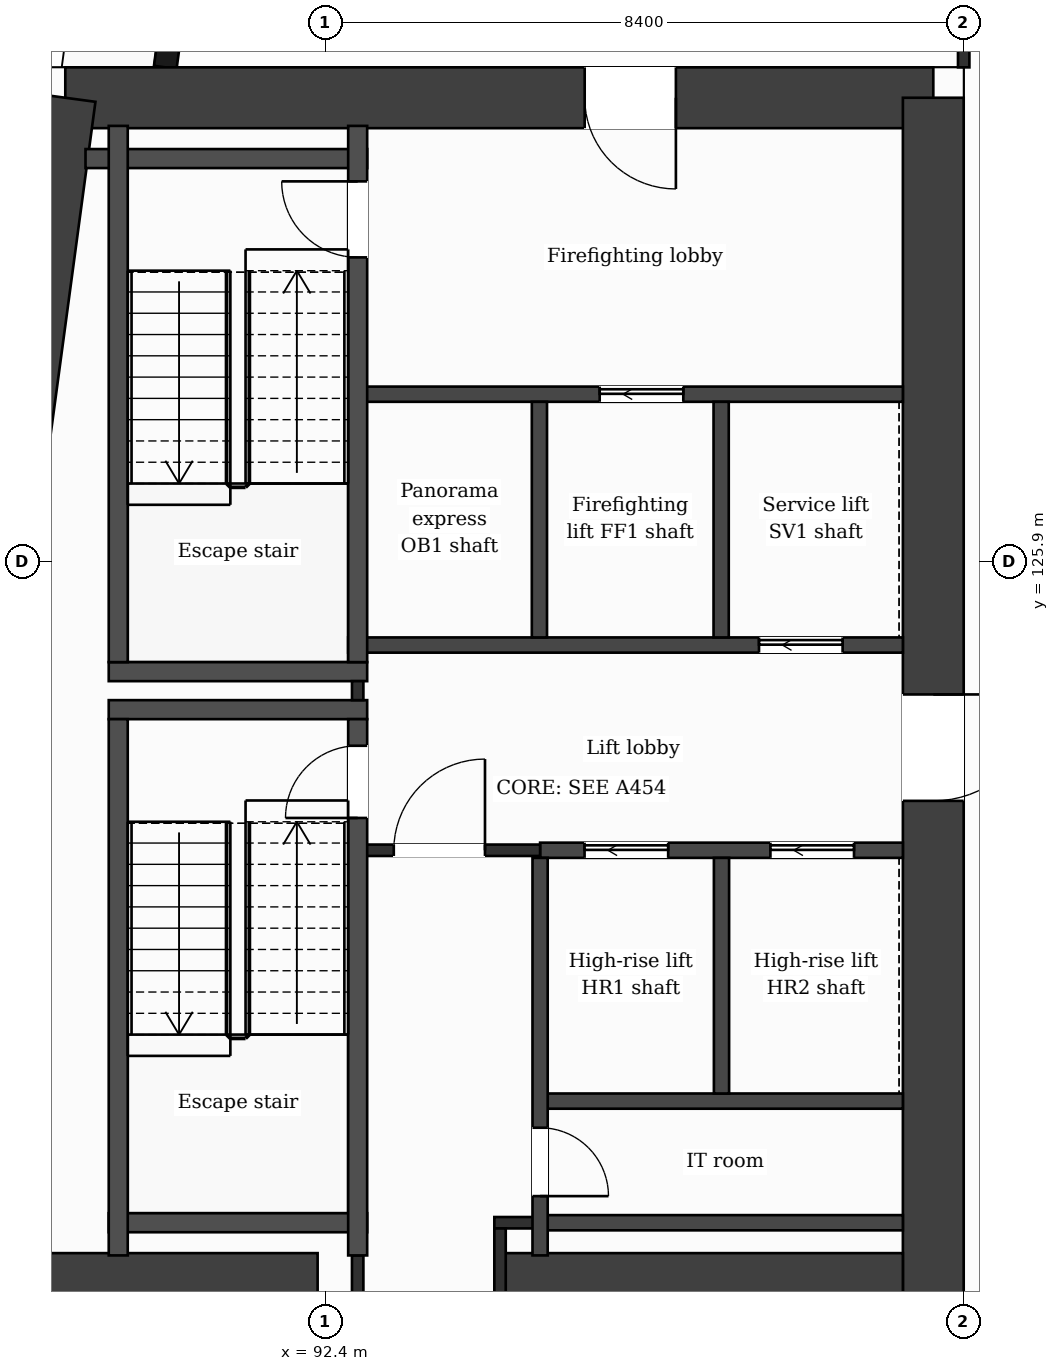
"""IFC4 building model, lengths in metres.
Left out: names, types, materials, properties, quantities, classifications, styles, units other than length and angle.
Written with IfcOpenShell. Run it as: python <this file> out.ifc"""

import sys

from ifc_helpers import new_model, si_unit, direction, frame, frame_2d, origin, place, context, subcontext, project, spatial, rectangle, extrude, element, fill, save


model = new_model("IFC4")
c1 = context("Model", 3, precision=1e-05, world=origin(), true_north=direction((0.0, 1.0)))
c2 = subcontext(c1, "Body", "Model", "MODEL_VIEW")
j1 = project(units=[si_unit("LENGTHUNIT", "METRE"), si_unit("PLANEANGLEUNIT", "RADIAN")], contexts=[c1])
p1 = place(None, origin())
s1 = spatial("IfcSite", under=j1, at=p1, CompositionType="ELEMENT")
p2 = place(p1, origin())
s2 = spatial("IfcBuilding", under=s1, at=p2, CompositionType="ELEMENT")
p3 = place(p2, frame((0.0, 0.0, 220.7)))
s3 = spatial("IfcBuildingStorey", under=s2, at=p3, CompositionType="ELEMENT", Elevation=220.7)
p4 = place(p3, frame((88.98, 132.0, 0.0), z_axis=(0.0, 0.0, 1.0), x_axis=(1.0, 0.0, 0.0)))
e1 = element("IfcWall", 1, at=p4, inside=s3, PredefinedType="SHEAR", context=c2, shape_type="SweptSolid", body=[
    extrude(rectangle(XDim=11.419, YDim=0.8, at=frame_2d((5.71, 0.0))), origin(), (0.0, 0.0, 1.0), 3.7),
])
p5 = place(p4, frame((6.833, 0.0, 0.0)))
e2 = element("IfcOpeningElement", 2, at=p5, cuts=e1, PredefinedType="OPENING", context=c2, shape_type="SweptSolid", body=[
    extrude(rectangle(XDim=1.2, YDim=2.1, at=frame_2d((0.6, 1.05))), frame((0.0, 0.41, 0.0), z_axis=(0.0, -1.0, 0.0), x_axis=(1.0, 0.0, 0.0)), (0.0, 0.0, 1.0), 0.82),
])
p6 = place(p3, frame((100.4, 132.0, 0.0), z_axis=(0.0, 0.0, 1.0), x_axis=(0.0, -1.0, 0.0)))
e3 = element("IfcWall", 3, at=p6, inside=s3, PredefinedType="SHEAR", context=c2, shape_type="SweptSolid", body=[
    extrude(rectangle(XDim=21.2, YDim=0.8, at=frame_2d((10.6, 0.0))), origin(), (0.0, 0.0, 1.0), 3.7),
])
p7 = place(p6, frame((7.85, 0.0, 0.0)))
e4 = element("IfcOpeningElement", 4, at=p7, cuts=e3, PredefinedType="OPENING", context=c2, shape_type="SweptSolid", body=[
    extrude(rectangle(XDim=1.4, YDim=2.1, at=frame_2d((0.7, 1.05))), frame((0.0, 0.41, 0.0), z_axis=(0.0, -1.0, 0.0), x_axis=(1.0, 0.0, 0.0)), (0.0, 0.0, 1.0), 0.82),
])
p8 = place(p3, frame((86.127, 110.8, 0.0), z_axis=(0.0, 0.0, 1.0), x_axis=(0.133408347329, 0.991061154956, 0.0)))
e5 = element("IfcWall", 5, at=p8, inside=s3, PredefinedType="SHEAR", context=c2, shape_type="SweptSolid", body=[
    extrude(rectangle(XDim=21.391, YDim=0.8, at=frame_2d((10.696, 0.0))), origin(), (0.0, 0.0, 1.0), 3.7),
])
p9 = place(p3, frame((87.223, 116.4, 0.0), z_axis=(0.0, 0.0, 1.0), x_axis=(1.0, 0.0, 0.0)))
e6 = element("IfcWall", 6, at=p9, inside=s3, PredefinedType="SHEAR", context=c2, shape_type="SweptSolid", body=[
    extrude(rectangle(XDim=5.077, YDim=0.8, at=frame_2d((2.539, 0.0))), origin(), (0.0, 0.0, 1.0), 3.7),
])
p10 = place(p3, frame((94.7, 116.4, 0.0), z_axis=(0.0, 0.0, 1.0), x_axis=(1.0, 0.0, 0.0)))
e7 = element("IfcWall", 7, at=p10, inside=s3, PredefinedType="SHEAR", context=c2, shape_type="SweptSolid", body=[
    extrude(rectangle(XDim=5.3, YDim=0.8, at=frame_2d((2.65, 0.0))), origin(), (0.0, 0.0, 1.0), 3.7),
])
p11 = place(p3, frame((91.177, 138.95, 0.0), z_axis=(0.0, 0.0, 1.0), x_axis=(-0.133426664613, -0.991058689065, 0.0)))
e8 = element("IfcWall", 8, at=p11, inside=s3, PredefinedType="SOLIDWALL", context=c2, shape_type="SweptSolid", body=[
    extrude(rectangle(XDim=6.609, YDim=0.3, at=frame_2d((3.305, 0.0))), origin(), (0.0, 0.0, 1.0), 3.38),
])
p12 = place(p11, frame((1.039, 0.0, 0.9)))
e9 = element("IfcOpeningElement", 9, at=p12, cuts=e8, PredefinedType="OPENING", context=c2, shape_type="SweptSolid", body=[
    extrude(rectangle(XDim=1.2, YDim=2.1, at=frame_2d((0.6, 1.05))), frame((0.0, 0.16, 0.0), z_axis=(0.0, -1.0, 0.0), x_axis=(1.0, 0.0, 0.0)), (0.0, 0.0, 1.0), 0.32),
])
p13 = place(p11, frame((4.294, 0.0, 0.0)))
e10 = element("IfcOpeningElement", 10, at=p13, cuts=e8, PredefinedType="OPENING", context=c2, shape_type="SweptSolid", body=[
    extrude(rectangle(XDim=1.2, YDim=2.4, at=frame_2d((0.6, 1.2))), frame((0.0, 0.16, 0.0), z_axis=(0.0, -1.0, 0.0), x_axis=(1.0, 0.0, 0.0)), (0.0, 0.0, 1.0), 0.32),
])
p14 = place(p3, frame((95.227, 117.2, 0.0), z_axis=(0.0, 0.0, 1.0), x_axis=(1.0, 0.0, 0.0)))
e11 = element("IfcWall", 11, at=p14, inside=s3, PredefinedType="PARTITIONING", context=c2, shape_type="SweptSolid", body=[
    extrude(rectangle(XDim=4.773, YDim=0.2, at=frame_2d((2.386, 0.0))), origin(), (0.0, 0.0, 1.0), 3.38),
])
p15 = place(p3, frame((94.625, 117.2, 0.0), z_axis=(0.0, 0.0, 1.0), x_axis=(1.0, 0.0, 0.0)))
e12 = element("IfcWall", 12, at=p15, inside=s3, PredefinedType="PARTITIONING", context=c2, shape_type="SweptSolid", body=[
    extrude(rectangle(XDim=0.602, YDim=0.15, at=frame_2d((0.301, 0.0))), origin(), (0.0, 0.0, 1.0), 3.38),
])
p16 = place(p3, frame((89.552, 117.2, 0.0), z_axis=(0.0, 0.0, 1.0), x_axis=(1.0, 0.0, 0.0)))
e13 = element("IfcWall", 13, at=p16, inside=s3, PredefinedType="PARTITIONING", context=c2, shape_type="SweptSolid", body=[
    extrude(rectangle(XDim=3.4, YDim=0.25, at=frame_2d((1.7, 0.0))), origin(), (0.0, 0.0, 1.0), 3.38),
])
p17 = place(p3, frame((95.227, 118.8, 0.0), z_axis=(0.0, 0.0, 1.0), x_axis=(1.0, 0.0, 0.0)))
e14 = element("IfcWall", 14, at=p17, inside=s3, PredefinedType="PARTITIONING", context=c2, shape_type="SweptSolid", body=[
    extrude(rectangle(XDim=4.773, YDim=0.2, at=frame_2d((2.386, 0.0))), origin(), (0.0, 0.0, 1.0), 3.38),
])
p18 = place(p3, frame((95.227, 122.1, 0.0), z_axis=(0.0, 0.0, 1.0), x_axis=(1.0, 0.0, 0.0)))
e15 = element("IfcWall", 15, at=p18, inside=s3, PredefinedType="PARTITIONING", context=c2, shape_type="SweptSolid", body=[
    extrude(rectangle(XDim=4.773, YDim=0.2, at=frame_2d((2.386, 0.0))), origin(), (0.0, 0.0, 1.0), 3.38),
])
p19 = place(p18, frame((0.585, 0.0, 0.0)))
e16 = element("IfcOpeningElement", 16, at=p19, cuts=e15, PredefinedType="OPENING", context=c2, shape_type="SweptSolid", body=[
    extrude(rectangle(XDim=1.1, YDim=2.1, at=frame_2d((0.55, 1.05))), frame((0.0, 0.11, 0.0), z_axis=(0.0, -1.0, 0.0), x_axis=(1.0, 0.0, 0.0)), (0.0, 0.0, 1.0), 0.22),
])
p20 = place(p18, frame((3.03, 0.0, 0.0)))
e17 = element("IfcOpeningElement", 17, at=p20, cuts=e15, PredefinedType="OPENING", context=c2, shape_type="SweptSolid", body=[
    extrude(rectangle(XDim=1.1, YDim=2.1, at=frame_2d((0.55, 1.05))), frame((0.0, 0.11, 0.0), z_axis=(0.0, -1.0, 0.0), x_axis=(1.0, 0.0, 0.0)), (0.0, 0.0, 1.0), 0.22),
])
p21 = place(p3, frame((92.827, 122.1, 0.0), z_axis=(0.0, 0.0, 1.0), x_axis=(1.0, 0.0, 0.0)))
e18 = element("IfcWall", 18, at=p21, inside=s3, PredefinedType="PARTITIONING", context=c2, shape_type="SweptSolid", body=[
    extrude(rectangle(XDim=2.4, YDim=0.15, at=frame_2d((1.2, 0.0))), origin(), (0.0, 0.0, 1.0), 3.38),
])
p22 = place(p21, frame((0.475, 0.0, 0.0)))
e19 = element("IfcOpeningElement", 19, at=p22, cuts=e18, PredefinedType="OPENING", context=c2, shape_type="SweptSolid", body=[
    extrude(rectangle(XDim=1.2, YDim=2.1, at=frame_2d((0.6, 1.05))), frame((0.0, 0.085, 0.0), z_axis=(0.0, -1.0, 0.0), x_axis=(1.0, 0.0, 0.0)), (0.0, 0.0, 1.0), 0.17),
])
for number, where, z_axis, x_axis in (
    (20, (89.552, 123.95, 0.0), (0.0, 0.0, 1.0), (1.0, 0.0, 0.0)),
    (21, (89.552, 124.45, 0.0), (0.0, 0.0, 1.0), (1.0, 0.0, 0.0)),
):
    element("IfcWall", number, at=place(p3, frame(where, z_axis=z_axis, x_axis=x_axis)), inside=s3, PredefinedType="PARTITIONING", context=c2, shape_type="SweptSolid", body=[
        extrude(rectangle(XDim=3.4, YDim=0.25, at=frame_2d((1.7, 0.0))), origin(), (0.0, 0.0, 1.0), 3.38),
    ])
p23 = place(p3, frame((92.702, 124.8, 0.0), z_axis=(0.0, 0.0, 1.0), x_axis=(1.0, 0.0, 0.0)))
e22 = element("IfcWall", 22, at=p23, inside=s3, PredefinedType="PARTITIONING", context=c2, shape_type="SweptSolid", body=[
    extrude(rectangle(XDim=7.298, YDim=0.2, at=frame_2d((3.649, 0.0))), origin(), (0.0, 0.0, 1.0), 3.38),
])
p24 = place(p23, frame((5.405, 0.0, 0.0)))
e23 = element("IfcOpeningElement", 23, at=p24, cuts=e22, PredefinedType="OPENING", context=c2, shape_type="SweptSolid", body=[
    extrude(rectangle(XDim=1.1, YDim=2.1, at=frame_2d((0.55, 1.05))), frame((0.0, 0.11, 0.0), z_axis=(0.0, -1.0, 0.0), x_axis=(1.0, 0.0, 0.0)), (0.0, 0.0, 1.0), 0.22),
])
p25 = place(p3, frame((92.827, 128.1, 0.0), z_axis=(0.0, 0.0, 1.0), x_axis=(1.0, 0.0, 0.0)))
e24 = element("IfcWall", 24, at=p25, inside=s3, PredefinedType="PARTITIONING", context=c2, shape_type="SweptSolid", body=[
    extrude(rectangle(XDim=7.173, YDim=0.2, at=frame_2d((3.586, 0.0))), origin(), (0.0, 0.0, 1.0), 3.38),
])
p26 = place(p25, frame((3.184, 0.0, 0.0)))
e25 = element("IfcOpeningElement", 25, at=p26, cuts=e24, PredefinedType="OPENING", context=c2, shape_type="SweptSolid", body=[
    extrude(rectangle(XDim=1.1, YDim=2.1, at=frame_2d((0.55, 1.05))), frame((0.0, 0.11, 0.0), z_axis=(0.0, -1.0, 0.0), x_axis=(1.0, 0.0, 0.0)), (0.0, 0.0, 1.0), 0.22),
])
p27 = place(p3, frame((89.246, 131.2, 0.0), z_axis=(0.0, 0.0, 1.0), x_axis=(1.0, 0.0, 0.0)))
e26 = element("IfcWall", 26, at=p27, inside=s3, PredefinedType="PARTITIONING", context=c2, shape_type="SweptSolid", body=[
    extrude(rectangle(XDim=3.706, YDim=0.25, at=frame_2d((1.853, 0.0))), origin(), (0.0, 0.0, 1.0), 3.38),
])
for number, where, z_axis, x_axis in (
    (27, (89.677, 116.77, 0.0), (0.0, 0.0, 1.0), (0.0, 1.0, 0.0)),
    (28, (89.677, 124.575, 0.0), (0.0, 0.0, 1.0), (0.0, 1.0, 0.0)),
):
    element("IfcWall", number, at=place(p3, frame(where, z_axis=z_axis, x_axis=x_axis)), inside=s3, PredefinedType="PARTITIONING", context=c2, shape_type="SweptSolid", body=[
        extrude(rectangle(XDim=7.055, YDim=0.25, at=frame_2d((3.527, 0.0))), origin(), (0.0, 0.0, 1.0), 3.38),
    ])
p28 = place(p3, frame((92.827, 116.0, 0.0), z_axis=(0.0, 0.0, 1.0), x_axis=(0.0, 1.0, 0.0)))
e29 = element("IfcWall", 29, at=p28, inside=s3, PredefinedType="PARTITIONING", context=c2, shape_type="SweptSolid", body=[
    extrude(rectangle(XDim=0.77, YDim=0.15, at=frame_2d((0.385, 0.0))), origin(), (0.0, 0.0, 1.0), 3.38),
])
p29 = place(p3, frame((92.827, 124.075, 0.0), z_axis=(0.0, 0.0, 1.0), x_axis=(0.0, 1.0, 0.0)))
e30 = element("IfcWall", 30, at=p29, inside=s3, PredefinedType="PARTITIONING", context=c2, shape_type="SweptSolid", body=[
    extrude(rectangle(XDim=0.25, YDim=0.15, at=frame_2d((0.125, 0.0))), origin(), (0.0, 0.0, 1.0), 3.38),
])
p30 = place(p3, frame((92.827, 116.77, 0.0), z_axis=(0.0, 0.0, 1.0), x_axis=(0.0, 1.0, 0.0)))
e31 = element("IfcWall", 31, at=p30, inside=s3, PredefinedType="PARTITIONING", context=c2, shape_type="SweptSolid", body=[
    extrude(rectangle(XDim=7.055, YDim=0.25, at=frame_2d((3.527, 0.0))), origin(), (0.0, 0.0, 1.0), 3.38),
])
p31 = place(p30, frame((5.755, 0.0, 0.0)))
e32 = element("IfcOpeningElement", 32, at=p31, cuts=e31, PredefinedType="OPENING", context=c2, shape_type="SweptSolid", body=[
    extrude(rectangle(XDim=0.95, YDim=2.1, at=frame_2d((0.475, 1.05))), frame((0.0, 0.135, 0.0), z_axis=(0.0, -1.0, 0.0), x_axis=(1.0, 0.0, 0.0)), (0.0, 0.0, 1.0), 0.27),
])
p32 = place(p3, frame((92.827, 124.575, 0.0), z_axis=(0.0, 0.0, 1.0), x_axis=(0.0, 1.0, 0.0)))
e33 = element("IfcWall", 33, at=p32, inside=s3, PredefinedType="PARTITIONING", context=c2, shape_type="SweptSolid", body=[
    extrude(rectangle(XDim=7.055, YDim=0.25, at=frame_2d((3.527, 0.0))), origin(), (0.0, 0.0, 1.0), 3.38),
])
p33 = place(p32, frame((5.325, 0.0, 0.0)))
e34 = element("IfcOpeningElement", 34, at=p33, cuts=e33, PredefinedType="OPENING", context=c2, shape_type="SweptSolid", body=[
    extrude(rectangle(XDim=1.0, YDim=2.1, at=frame_2d((0.5, 1.05))), frame((0.0, 0.135, 0.0), z_axis=(0.0, -1.0, 0.0), x_axis=(1.0, 0.0, 0.0)), (0.0, 0.0, 1.0), 0.27),
])
p34 = place(p3, frame((94.7, 116.0, 0.0), z_axis=(0.0, 0.0, 1.0), x_axis=(0.0, 1.0, 0.0)))
e35 = element("IfcWall", 35, at=p34, inside=s3, PredefinedType="PARTITIONING", context=c2, shape_type="SweptSolid", body=[
    extrude(rectangle(XDim=1.125, YDim=0.15, at=frame_2d((0.562, 0.0))), origin(), (0.0, 0.0, 1.0), 3.38),
])
p35 = place(p3, frame((95.218, 124.9, 0.0), z_axis=(0.0, 0.0, 1.0), x_axis=(0.0, 1.0, 0.0)))
e36 = element("IfcWall", 36, at=p35, inside=s3, PredefinedType="PARTITIONING", context=c2, shape_type="SweptSolid", body=[
    extrude(rectangle(XDim=3.1, YDim=0.2, at=frame_2d((1.55, 0.0))), origin(), (0.0, 0.0, 1.0), 3.38),
])
p36 = place(p3, frame((95.227, 116.77, 0.0), z_axis=(0.0, 0.0, 1.0), x_axis=(0.0, 1.0, 0.0)))
e37 = element("IfcWall", 37, at=p36, inside=s3, PredefinedType="PARTITIONING", context=c2, shape_type="SweptSolid", body=[
    extrude(rectangle(XDim=5.23, YDim=0.2, at=frame_2d((2.615, 0.0))), origin(), (0.0, 0.0, 1.0), 3.38),
])
p37 = place(p36, frame((0.78, 0.0, 0.0)))
e38 = element("IfcOpeningElement", 38, at=p37, cuts=e37, PredefinedType="OPENING", context=c2, shape_type="SweptSolid", body=[
    extrude(rectangle(XDim=0.9, YDim=2.1, at=frame_2d((0.45, 1.05))), frame((0.0, 0.11, 0.0), z_axis=(0.0, -1.0, 0.0), x_axis=(1.0, 0.0, 0.0)), (0.0, 0.0, 1.0), 0.22),
])
for number, where, z_axis, x_axis in (
    (39, (97.609, 124.9, 0.0), (0.0, 0.0, 1.0), (0.0, 1.0, 0.0)),
    (40, (97.614, 118.9, 0.0), (0.0, 0.0, 1.0), (0.0, 1.0, 0.0)),
):
    element("IfcWall", number, at=place(p3, frame(where, z_axis=z_axis, x_axis=x_axis)), inside=s3, PredefinedType="PARTITIONING", context=c2, shape_type="SweptSolid", body=[
        extrude(rectangle(XDim=3.1, YDim=0.2, at=frame_2d((1.55, 0.0))), origin(), (0.0, 0.0, 1.0), 3.38),
    ])
p38 = place(p3, frame((100.8, 132.4, 0.0), z_axis=(0.0, 0.0, 1.0), x_axis=(0.0, 1.0, 0.0)))
e41 = element("IfcWall", 41, at=p38, inside=s3, PredefinedType="PARTITIONING", context=c2, shape_type="SweptSolid", body=[
    extrude(rectangle(XDim=1.325, YDim=0.15, at=frame_2d((0.663, 0.0))), origin(), (0.0, 0.0, 1.0), 3.38),
])
p39 = place(p22, origin())
e42 = element("IfcDoor", 42, at=p39, inside=s3, OperationType="SINGLE_SWING_RIGHT", PredefinedType="DOOR", context=c2, shape_type="SweptSolid", body=[
    extrude(rectangle(XDim=1.2, YDim=2.1, at=frame_2d((0.6, 1.05))), frame((0.0, 0.025, 0.0), z_axis=(0.0, -1.0, 0.0), x_axis=(1.0, 0.0, 0.0)), (0.0, 0.0, 1.0), 0.05),
])
fill(e19, e42)
p40 = place(p19, origin())
e43 = element("IfcDoor", 43, at=p40, inside=s3, OperationType="SLIDING_TO_LEFT", PredefinedType="DOOR", context=c2, shape_type="SweptSolid", body=[
    extrude(rectangle(XDim=1.1, YDim=2.1, at=frame_2d((0.55, 1.05))), frame((0.0, 0.025, 0.0), z_axis=(0.0, -1.0, 0.0), x_axis=(1.0, 0.0, 0.0)), (0.0, 0.0, 1.0), 0.05),
])
fill(e16, e43)
p41 = place(p20, origin())
e44 = element("IfcDoor", 44, at=p41, inside=s3, OperationType="SLIDING_TO_LEFT", PredefinedType="DOOR", context=c2, shape_type="SweptSolid", body=[
    extrude(rectangle(XDim=1.1, YDim=2.1, at=frame_2d((0.55, 1.05))), frame((0.0, 0.025, 0.0), z_axis=(0.0, -1.0, 0.0), x_axis=(1.0, 0.0, 0.0)), (0.0, 0.0, 1.0), 0.05),
])
fill(e17, e44)
p42 = place(p26, origin())
e45 = element("IfcDoor", 45, at=p42, inside=s3, OperationType="SLIDING_TO_LEFT", PredefinedType="DOOR", context=c2, shape_type="SweptSolid", body=[
    extrude(rectangle(XDim=1.1, YDim=2.1, at=frame_2d((0.55, 1.05))), frame((0.0, 0.025, 0.0), z_axis=(0.0, -1.0, 0.0), x_axis=(1.0, 0.0, 0.0)), (0.0, 0.0, 1.0), 0.05),
])
fill(e25, e45)
p43 = place(p24, origin())
e46 = element("IfcDoor", 46, at=p43, inside=s3, OperationType="SLIDING_TO_LEFT", PredefinedType="DOOR", context=c2, shape_type="SweptSolid", body=[
    extrude(rectangle(XDim=1.1, YDim=2.1, at=frame_2d((0.55, 1.05))), frame((0.0, 0.025, 0.0), z_axis=(0.0, -1.0, 0.0), x_axis=(1.0, 0.0, 0.0)), (0.0, 0.0, 1.0), 0.05),
])
fill(e23, e46)
p44 = place(p31, origin())
e47 = element("IfcDoor", 47, at=p44, inside=s3, OperationType="SINGLE_SWING_LEFT", PredefinedType="DOOR", context=c2, shape_type="SweptSolid", body=[
    extrude(rectangle(XDim=0.95, YDim=2.1, at=frame_2d((0.475, 1.05))), frame((0.0, 0.025, 0.0), z_axis=(0.0, -1.0, 0.0), x_axis=(1.0, 0.0, 0.0)), (0.0, 0.0, 1.0), 0.05),
])
fill(e32, e47)
p45 = place(p33, origin())
e48 = element("IfcDoor", 48, at=p45, inside=s3, OperationType="SINGLE_SWING_RIGHT", PredefinedType="DOOR", context=c2, shape_type="SweptSolid", body=[
    extrude(rectangle(XDim=1.0, YDim=2.1, at=frame_2d((0.5, 1.05))), frame((0.0, 0.025, 0.0), z_axis=(0.0, -1.0, 0.0), x_axis=(1.0, 0.0, 0.0)), (0.0, 0.0, 1.0), 0.05),
])
fill(e34, e48)
p46 = place(p37, origin())
e49 = element("IfcDoor", 49, at=p46, inside=s3, OperationType="SINGLE_SWING_LEFT", PredefinedType="DOOR", context=c2, shape_type="SweptSolid", body=[
    extrude(rectangle(XDim=0.9, YDim=2.1, at=frame_2d((0.45, 1.05))), frame((0.0, 0.025, 0.0), z_axis=(0.0, -1.0, 0.0), x_axis=(1.0, 0.0, 0.0)), (0.0, 0.0, 1.0), 0.05),
])
fill(e38, e49)
p47 = place(p5, origin())
e50 = element("IfcDoor", 50, at=p47, inside=s3, OperationType="SINGLE_SWING_RIGHT", PredefinedType="DOOR", context=c2, shape_type="SweptSolid", body=[
    extrude(rectangle(XDim=1.2, YDim=2.1, at=frame_2d((0.6, 1.05))), frame((0.0, 0.025, 0.0), z_axis=(0.0, -1.0, 0.0), x_axis=(1.0, 0.0, 0.0)), (0.0, 0.0, 1.0), 0.05),
])
fill(e2, e50)
p48 = place(p7, origin())
e51 = element("IfcDoor", 51, at=p48, inside=s3, OperationType="SINGLE_SWING_LEFT", PredefinedType="DOOR", context=c2, shape_type="SweptSolid", body=[
    extrude(rectangle(XDim=1.4, YDim=2.1, at=frame_2d((0.7, 1.05))), frame((0.0, 0.025, 0.0), z_axis=(0.0, -1.0, 0.0), x_axis=(1.0, 0.0, 0.0)), (0.0, 0.0, 1.0), 0.05),
])
fill(e4, e51)
save(model, sys.argv[1])
